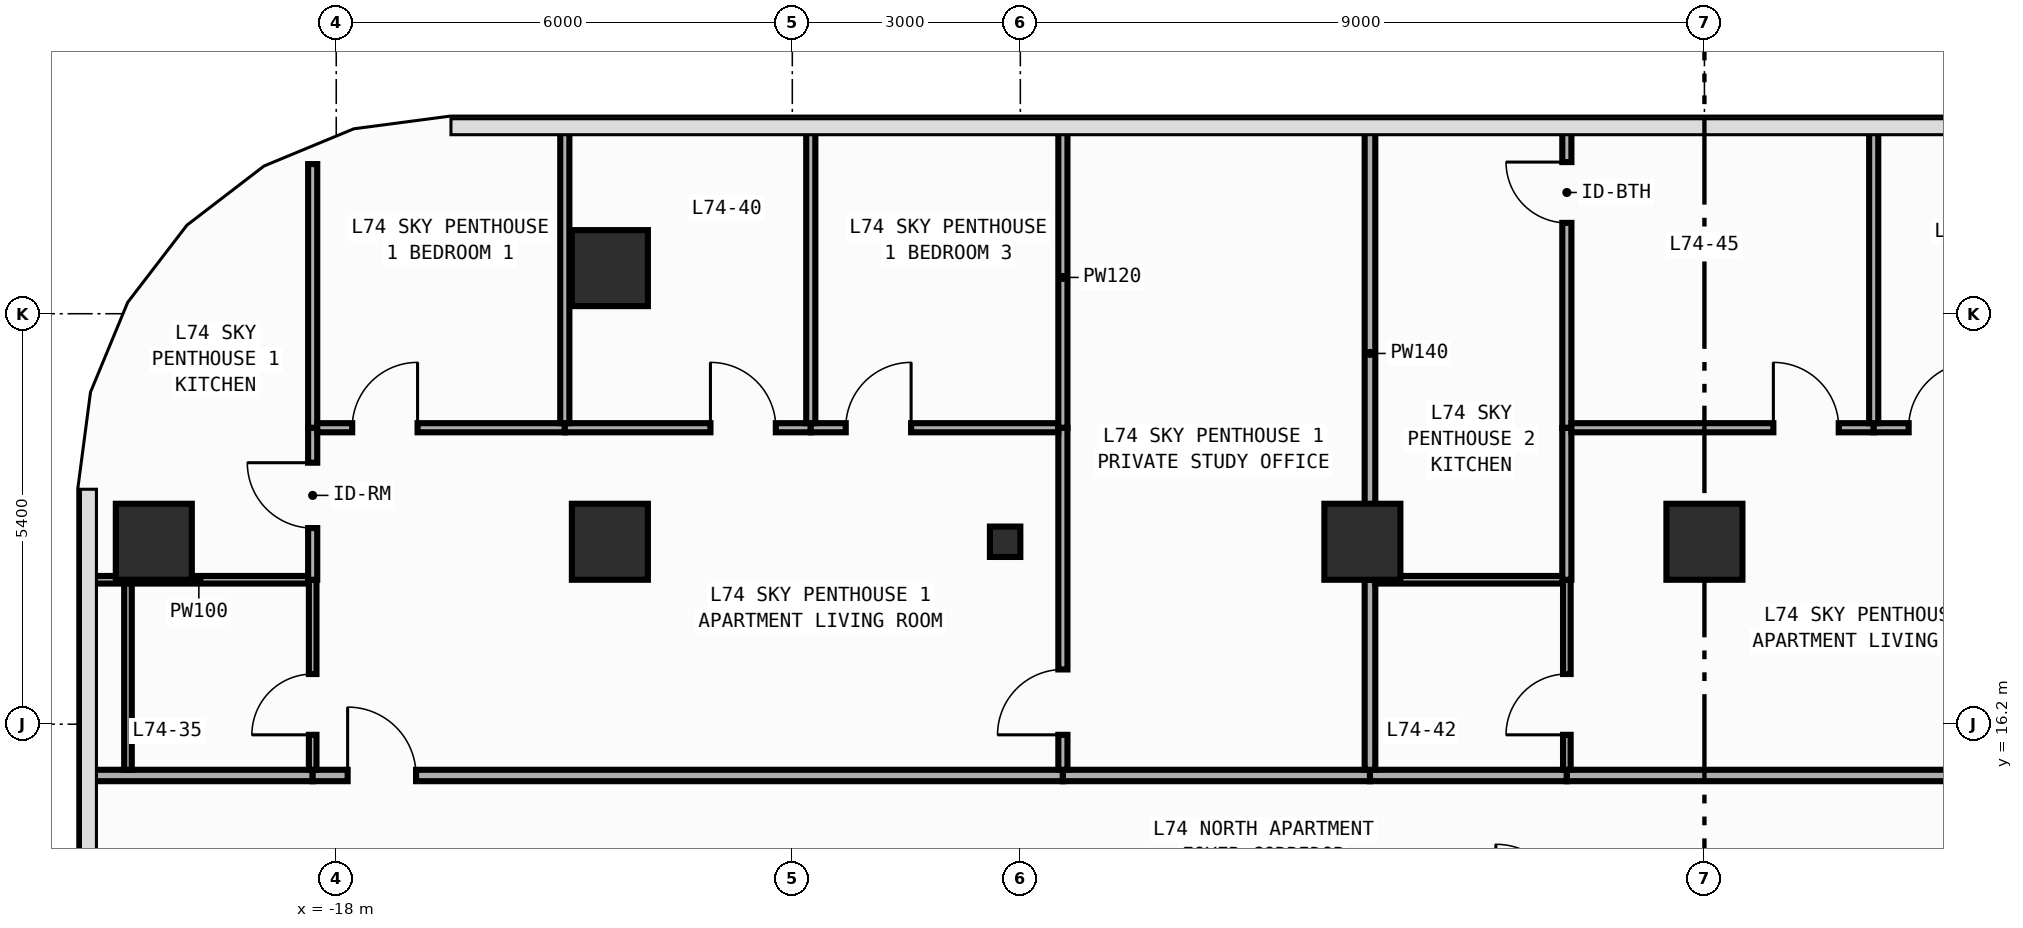
"""IFC4 building model, lengths in metres.
Left out: names, types, materials, properties, quantities, classifications, styles, units other than length and angle.
Written with IfcOpenShell. Run it as: python <this file> out.ifc"""

import sys

from ifc_helpers import new_model, si_unit, direction, frame, frame_2d, origin, origin_2d, place, context, subcontext, project, spatial, rectangle, circle, i_section, extrude, element, fill, save


model = new_model("IFC4")
c1 = context("Model", 3, precision=1e-05, world=origin(), true_north=direction((0.0, 1.0)))
c2 = subcontext(c1, "Body", "Model", "MODEL_VIEW")
j1 = project(units=[si_unit("LENGTHUNIT", "METRE"), si_unit("PLANEANGLEUNIT", "RADIAN")], contexts=[c1])
p1 = place(None, origin())
s1 = spatial("IfcSite", under=j1, at=p1, CompositionType="ELEMENT")
p2 = place(p1, origin())
s2 = spatial("IfcBuilding", under=s1, at=p2, CompositionType="ELEMENT")
p3 = place(p2, frame((0.0, 0.0, 308.0)))
s3 = spatial("IfcBuildingStorey", under=s2, at=p3, CompositionType="ELEMENT", Elevation=308.0)
p4 = place(p3, frame((-9.2, 18.6, 0.0), z_axis=(0.0, 0.0, 1.0), x_axis=(1.0, 0.0, 0.0)))
e1 = element("IfcColumn", 1, at=p4, inside=s3, PredefinedType="COLUMN", context=c2, shape_type="SweptSolid", body=[
    extrude(i_section(OverallWidth=0.4, OverallDepth=0.4, WebThickness=0.013, FlangeThickness=0.021, FilletRadius=0.022, at=origin_2d()), origin(), (0.0, 0.0, 1.0), 3.8),
])
for number, where, z_axis, x_axis in (
    (2, (-20.4, 18.6, 0.0), (0.0, 0.0, 1.0), (1.0, 0.0, 0.0)),
    (3, (-14.4, 18.6, 0.0), (0.0, 0.0, 1.0), (1.0, 0.0, 0.0)),
    (4, (-4.5, 18.6, 0.0), (0.0, 0.0, 1.0), (1.0, 0.0, 0.0)),
    (5, (0.0, 18.6, 0.0), (0.0, 0.0, 1.0), (1.0, 0.0, 0.0)),
    (6, (-14.4, 22.2, 0.0), (0.0, 0.0, 1.0), (1.0, 0.0, 0.0)),
):
    element("IfcColumn", number, at=place(p3, frame(where, z_axis=z_axis, x_axis=x_axis)), inside=s3, PredefinedType="COLUMN", context=c2, shape_type="SweptSolid", body=[
        extrude(circle(Radius=0.5, at=origin_2d()), origin(), (0.0, 0.0, 1.0), 3.8),
    ])
p5 = place(p3, frame((-21.255, 15.525, 0.0), z_axis=(0.0, 0.0, 1.0), x_axis=(1.0, 0.0, 0.0)))
e7 = element("IfcWall", 7, at=p5, inside=s3, PredefinedType="PARTITIONING", context=c2, shape_type="SweptSolid", body=[
    extrude(rectangle(XDim=2.945, YDim=0.15, at=frame_2d((1.472, 0.0))), origin(), (0.0, 0.0, 1.0), 3.54),
])
p6 = place(p3, frame((-18.31, 15.525, 0.0), z_axis=(0.0, 0.0, 1.0), x_axis=(1.0, 0.0, 0.0)))
e8 = element("IfcWall", 8, at=p6, inside=s3, PredefinedType="PARTITIONING", context=c2, shape_type="SweptSolid", body=[
    extrude(rectangle(XDim=9.87, YDim=0.15, at=frame_2d((4.935, 0.0))), origin(), (0.0, 0.0, 1.0), 3.54),
])
p7 = place(p6, frame((0.46, 0.0, 0.0)))
e9 = element("IfcOpeningElement", 9, at=p7, cuts=e8, PredefinedType="OPENING", context=c2, shape_type="SweptSolid", body=[
    extrude(rectangle(XDim=0.9, YDim=2.15, at=frame_2d((0.45, 1.075))), frame((0.0, 0.085, 0.0), z_axis=(0.0, -1.0, 0.0), x_axis=(1.0, 0.0, 0.0)), (0.0, 0.0, 1.0), 0.17),
])
p8 = place(p3, frame((-8.44, 15.525, 0.0), z_axis=(0.0, 0.0, 1.0), x_axis=(1.0, 0.0, 0.0)))
e10 = element("IfcWall", 10, at=p8, inside=s3, PredefinedType="PARTITIONING", context=c2, shape_type="SweptSolid", body=[
    extrude(rectangle(XDim=4.04, YDim=0.15, at=frame_2d((2.02, 0.0))), origin(), (0.0, 0.0, 1.0), 3.54),
])
p9 = place(p3, frame((-4.4, 15.525, 0.0), z_axis=(0.0, 0.0, 1.0), x_axis=(1.0, 0.0, 0.0)))
e11 = element("IfcWall", 11, at=p9, inside=s3, PredefinedType="PARTITIONING", context=c2, shape_type="SweptSolid", body=[
    extrude(rectangle(XDim=2.59, YDim=0.15, at=frame_2d((1.295, 0.0))), origin(), (0.0, 0.0, 1.0), 3.54),
])
p10 = place(p3, frame((-1.81, 15.525, 0.0), z_axis=(0.0, 0.0, 1.0), x_axis=(1.0, 0.0, 0.0)))
e12 = element("IfcWall", 12, at=p10, inside=s3, PredefinedType="PARTITIONING", context=c2, shape_type="SweptSolid", body=[
    extrude(rectangle(XDim=11.25, YDim=0.15, at=frame_2d((5.625, 0.0))), origin(), (0.0, 0.0, 1.0), 3.54),
])
p11 = place(p10, frame((8.486, 0.0, 0.0)))
e13 = element("IfcOpeningElement", 13, at=p11, cuts=e12, PredefinedType="OPENING", context=c2, shape_type="SweptSolid", body=[
    extrude(rectangle(XDim=0.9, YDim=2.15, at=frame_2d((0.45, 1.075))), frame((0.0, 0.085, 0.0), z_axis=(0.0, -1.0, 0.0), x_axis=(1.0, 0.0, 0.0)), (0.0, 0.0, 1.0), 0.17),
])
p12 = place(p3, frame((-21.255, 18.1, 0.0), z_axis=(0.0, 0.0, 1.0), x_axis=(1.0, 0.0, 0.0)))
e14 = element("IfcWall", 14, at=p12, inside=s3, PredefinedType="PARTITIONING", context=c2, shape_type="SweptSolid", body=[
    extrude(rectangle(XDim=2.895, YDim=0.1, at=frame_2d((1.447, 0.0))), origin(), (0.0, 0.0, 1.0), 3.54),
])
p13 = place(p3, frame((-18.31, 15.6, 0.0), z_axis=(0.0, 0.0, 1.0), x_axis=(0.0, 1.0, 0.0)))
e15 = element("IfcWall", 15, at=p13, inside=s3, PredefinedType="PARTITIONING", context=c2, shape_type="SweptSolid", body=[
    extrude(rectangle(XDim=2.5, YDim=0.1, at=frame_2d((1.25, 0.0))), origin(), (0.0, 0.0, 1.0), 3.54),
])
p14 = place(p13, frame((0.46, 0.0, 0.0)))
e16 = element("IfcOpeningElement", 16, at=p14, cuts=e15, PredefinedType="OPENING", context=c2, shape_type="SweptSolid", body=[
    extrude(rectangle(XDim=0.8, YDim=2.1, at=frame_2d((0.4, 1.05))), frame((0.0, 0.06, 0.0), z_axis=(0.0, -1.0, 0.0), x_axis=(1.0, 0.0, 0.0)), (0.0, 0.0, 1.0), 0.12),
])
p15 = place(p3, frame((-18.31, 18.1, 0.0), z_axis=(0.0, 0.0, 1.0), x_axis=(0.0, 1.0, 0.0)))
e17 = element("IfcWall", 17, at=p15, inside=s3, PredefinedType="PARTITIONING", context=c2, shape_type="SweptSolid", body=[
    extrude(rectangle(XDim=2.0, YDim=0.12, at=frame_2d((1.0, 0.0))), origin(), (0.0, 0.0, 1.0), 3.54),
])
p16 = place(p15, frame((0.68, 0.0, 0.0)))
e18 = element("IfcOpeningElement", 18, at=p16, cuts=e17, PredefinedType="OPENING", context=c2, shape_type="SweptSolid", body=[
    extrude(rectangle(XDim=0.86, YDim=2.15, at=frame_2d((0.43, 1.075))), frame((0.0, 0.07, 0.0), z_axis=(0.0, -1.0, 0.0), x_axis=(1.0, 0.0, 0.0)), (0.0, 0.0, 1.0), 0.14),
])
p17 = place(p3, frame((-18.31, 20.1, 0.0), z_axis=(0.0, 0.0, 1.0), x_axis=(0.0, 1.0, 0.0)))
e19 = element("IfcWall", 19, at=p17, inside=s3, PredefinedType="PARTITIONING", context=c2, shape_type="SweptSolid", body=[
    extrude(rectangle(XDim=3.469, YDim=0.12, at=frame_2d((1.734, 0.0))), origin(), (0.0, 0.0, 1.0), 3.54),
])
p18 = place(p3, frame((-8.44, 15.6, 0.0), z_axis=(0.0, 0.0, 1.0), x_axis=(0.0, 1.0, 0.0)))
e20 = element("IfcWall", 20, at=p18, inside=s3, PredefinedType="PARTITIONING", context=c2, shape_type="SweptSolid", body=[
    extrude(rectangle(XDim=4.5, YDim=0.12, at=frame_2d((2.25, 0.0))), origin(), (0.0, 0.0, 1.0), 3.54),
])
p19 = place(p18, frame((0.46, 0.0, 0.0)))
e21 = element("IfcOpeningElement", 21, at=p19, cuts=e20, PredefinedType="OPENING", context=c2, shape_type="SweptSolid", body=[
    extrude(rectangle(XDim=0.86, YDim=2.15, at=frame_2d((0.43, 1.075))), frame((0.0, 0.07, 0.0), z_axis=(0.0, -1.0, 0.0), x_axis=(1.0, 0.0, 0.0)), (0.0, 0.0, 1.0), 0.14),
])
p20 = place(p3, frame((-18.25, 20.1, 0.0), z_axis=(0.0, 0.0, 1.0), x_axis=(1.0, 0.0, 0.0)))
e22 = element("IfcWall", 22, at=p20, inside=s3, PredefinedType="PARTITIONING", context=c2, shape_type="SweptSolid", body=[
    extrude(rectangle(XDim=3.257, YDim=0.12, at=frame_2d((1.628, 0.0))), origin(), (0.0, 0.0, 1.0), 3.54),
])
p21 = place(p20, frame((0.46, 0.0, 0.0)))
e23 = element("IfcOpeningElement", 23, at=p21, cuts=e22, PredefinedType="OPENING", context=c2, shape_type="SweptSolid", body=[
    extrude(rectangle(XDim=0.86, YDim=2.15, at=frame_2d((0.43, 1.075))), frame((0.0, 0.07, 0.0), z_axis=(0.0, -1.0, 0.0), x_axis=(1.0, 0.0, 0.0)), (0.0, 0.0, 1.0), 0.14),
])
p22 = place(p3, frame((-14.993, 20.1, 0.0), z_axis=(0.0, 0.0, 1.0), x_axis=(1.0, 0.0, 0.0)))
e24 = element("IfcWall", 24, at=p22, inside=s3, PredefinedType="PARTITIONING", context=c2, shape_type="SweptSolid", body=[
    extrude(rectangle(XDim=3.236, YDim=0.12, at=frame_2d((1.618, 0.0))), origin(), (0.0, 0.0, 1.0), 3.54),
])
p23 = place(p22, frame((1.916, 0.0, 0.0)))
e25 = element("IfcOpeningElement", 25, at=p23, cuts=e24, PredefinedType="OPENING", context=c2, shape_type="SweptSolid", body=[
    extrude(rectangle(XDim=0.86, YDim=2.15, at=frame_2d((0.43, 1.075))), frame((0.0, 0.07, 0.0), z_axis=(0.0, -1.0, 0.0), x_axis=(1.0, 0.0, 0.0)), (0.0, 0.0, 1.0), 0.14),
])
p24 = place(p3, frame((-11.757, 20.1, 0.0), z_axis=(0.0, 0.0, 1.0), x_axis=(1.0, 0.0, 0.0)))
e26 = element("IfcWall", 26, at=p24, inside=s3, PredefinedType="PARTITIONING", context=c2, shape_type="SweptSolid", body=[
    extrude(rectangle(XDim=3.257, YDim=0.12, at=frame_2d((1.628, 0.0))), origin(), (0.0, 0.0, 1.0), 3.54),
])
p25 = place(p24, frame((0.46, 0.0, 0.0)))
e27 = element("IfcOpeningElement", 27, at=p25, cuts=e26, PredefinedType="OPENING", context=c2, shape_type="SweptSolid", body=[
    extrude(rectangle(XDim=0.86, YDim=2.15, at=frame_2d((0.43, 1.075))), frame((0.0, 0.07, 0.0), z_axis=(0.0, -1.0, 0.0), x_axis=(1.0, 0.0, 0.0)), (0.0, 0.0, 1.0), 0.14),
])
p26 = place(p3, frame((-8.44, 20.1, 0.0), z_axis=(0.0, 0.0, 1.0), x_axis=(0.0, 1.0, 0.0)))
e28 = element("IfcWall", 28, at=p26, inside=s3, PredefinedType="PARTITIONING", context=c2, shape_type="SweptSolid", body=[
    extrude(rectangle(XDim=3.955, YDim=0.12, at=frame_2d((1.978, 0.0))), origin(), (0.0, 0.0, 1.0), 3.54),
])
p27 = place(p3, frame((-4.4, 15.6, 0.0), z_axis=(0.0, 0.0, 1.0), x_axis=(0.0, 1.0, 0.0)))
e29 = element("IfcWall", 29, at=p27, inside=s3, PredefinedType="PARTITIONING", context=c2, shape_type="SweptSolid", body=[
    extrude(rectangle(XDim=2.5, YDim=0.14, at=frame_2d((1.25, 0.0))), origin(), (0.0, 0.0, 1.0), 3.54),
])
p28 = place(p3, frame((-4.4, 18.1, 0.0), z_axis=(0.0, 0.0, 1.0), x_axis=(0.0, 1.0, 0.0)))
e30 = element("IfcWall", 30, at=p28, inside=s3, PredefinedType="PARTITIONING", context=c2, shape_type="SweptSolid", body=[
    extrude(rectangle(XDim=5.955, YDim=0.14, at=frame_2d((2.978, 0.0))), origin(), (0.0, 0.0, 1.0), 3.54),
])
for number, where, z_axis, x_axis in (
    (31, (-14.993, 20.16, 0.0), (0.0, 0.0, 1.0), (0.0, 1.0, 0.0)),
    (32, (-11.757, 20.16, 0.0), (0.0, 0.0, 1.0), (0.0, 1.0, 0.0)),
):
    element("IfcWall", number, at=place(p3, frame(where, z_axis=z_axis, x_axis=x_axis)), inside=s3, PredefinedType="PARTITIONING", context=c2, shape_type="SweptSolid", body=[
        extrude(rectangle(XDim=3.895, YDim=0.12, at=frame_2d((1.948, 0.0))), origin(), (0.0, 0.0, 1.0), 3.54),
    ])
p29 = place(p3, frame((-4.33, 18.1, 0.0), z_axis=(0.0, 0.0, 1.0), x_axis=(1.0, 0.0, 0.0)))
e33 = element("IfcWall", 33, at=p29, inside=s3, PredefinedType="PARTITIONING", context=c2, shape_type="SweptSolid", body=[
    extrude(rectangle(XDim=2.47, YDim=0.1, at=frame_2d((1.235, 0.0))), origin(), (0.0, 0.0, 1.0), 3.54),
])
p30 = place(p3, frame((-1.81, 15.6, 0.0), z_axis=(0.0, 0.0, 1.0), x_axis=(0.0, 1.0, 0.0)))
e34 = element("IfcWall", 34, at=p30, inside=s3, PredefinedType="PARTITIONING", context=c2, shape_type="SweptSolid", body=[
    extrude(rectangle(XDim=2.5, YDim=0.1, at=frame_2d((1.25, 0.0))), origin(), (0.0, 0.0, 1.0), 3.54),
])
p31 = place(p30, frame((0.46, 0.0, 0.0)))
e35 = element("IfcOpeningElement", 35, at=p31, cuts=e34, PredefinedType="OPENING", context=c2, shape_type="SweptSolid", body=[
    extrude(rectangle(XDim=0.8, YDim=2.1, at=frame_2d((0.4, 1.05))), frame((0.0, 0.06, 0.0), z_axis=(0.0, -1.0, 0.0), x_axis=(1.0, 0.0, 0.0)), (0.0, 0.0, 1.0), 0.12),
])
p32 = place(p3, frame((-1.81, 18.1, 0.0), z_axis=(0.0, 0.0, 1.0), x_axis=(0.0, 1.0, 0.0)))
e36 = element("IfcWall", 36, at=p32, inside=s3, PredefinedType="PARTITIONING", context=c2, shape_type="SweptSolid", body=[
    extrude(rectangle(XDim=2.0, YDim=0.12, at=frame_2d((1.0, 0.0))), origin(), (0.0, 0.0, 1.0), 3.54),
])
p33 = place(p3, frame((-1.81, 20.1, 0.0), z_axis=(0.0, 0.0, 1.0), x_axis=(0.0, 1.0, 0.0)))
e37 = element("IfcWall", 37, at=p33, inside=s3, PredefinedType="PARTITIONING", context=c2, shape_type="SweptSolid", body=[
    extrude(rectangle(XDim=3.955, YDim=0.12, at=frame_2d((1.978, 0.0))), origin(), (0.0, 0.0, 1.0), 3.54),
])
p34 = place(p33, frame((2.695, 0.0, 0.0)))
e38 = element("IfcOpeningElement", 38, at=p34, cuts=e37, PredefinedType="OPENING", context=c2, shape_type="SweptSolid", body=[
    extrude(rectangle(XDim=0.8, YDim=2.1, at=frame_2d((0.4, 1.05))), frame((0.0, 0.07, 0.0), z_axis=(0.0, -1.0, 0.0), x_axis=(1.0, 0.0, 0.0)), (0.0, 0.0, 1.0), 0.14),
])
p35 = place(p3, frame((-1.75, 20.1, 0.0), z_axis=(0.0, 0.0, 1.0), x_axis=(1.0, 0.0, 0.0)))
e39 = element("IfcWall", 39, at=p35, inside=s3, PredefinedType="PARTITIONING", context=c2, shape_type="SweptSolid", body=[
    extrude(rectangle(XDim=3.977, YDim=0.12, at=frame_2d((1.989, 0.0))), origin(), (0.0, 0.0, 1.0), 3.54),
])
p36 = place(p35, frame((2.657, 0.0, 0.0)))
e40 = element("IfcOpeningElement", 40, at=p36, cuts=e39, PredefinedType="OPENING", context=c2, shape_type="SweptSolid", body=[
    extrude(rectangle(XDim=0.86, YDim=2.15, at=frame_2d((0.43, 1.075))), frame((0.0, 0.07, 0.0), z_axis=(0.0, -1.0, 0.0), x_axis=(1.0, 0.0, 0.0)), (0.0, 0.0, 1.0), 0.14),
])
p37 = place(p3, frame((2.227, 20.1, 0.0), z_axis=(0.0, 0.0, 1.0), x_axis=(1.0, 0.0, 0.0)))
e41 = element("IfcWall", 41, at=p37, inside=s3, PredefinedType="PARTITIONING", context=c2, shape_type="SweptSolid", body=[
    extrude(rectangle(XDim=3.956, YDim=0.12, at=frame_2d((1.978, 0.0))), origin(), (0.0, 0.0, 1.0), 3.54),
])
p38 = place(p37, frame((0.46, 0.0, 0.0)))
e42 = element("IfcOpeningElement", 42, at=p38, cuts=e41, PredefinedType="OPENING", context=c2, shape_type="SweptSolid", body=[
    extrude(rectangle(XDim=0.86, YDim=2.15, at=frame_2d((0.43, 1.075))), frame((0.0, 0.07, 0.0), z_axis=(0.0, -1.0, 0.0), x_axis=(1.0, 0.0, 0.0)), (0.0, 0.0, 1.0), 0.14),
])
p39 = place(p3, frame((2.227, 20.16, 0.0), z_axis=(0.0, 0.0, 1.0), x_axis=(0.0, 1.0, 0.0)))
e43 = element("IfcWall", 43, at=p39, inside=s3, PredefinedType="PARTITIONING", context=c2, shape_type="SweptSolid", body=[
    extrude(rectangle(XDim=3.895, YDim=0.12, at=frame_2d((1.948, 0.0))), origin(), (0.0, 0.0, 1.0), 3.54),
])
p40 = place(p3, frame((-20.74, 15.6, 0.0), z_axis=(0.0, 0.0, 1.0), x_axis=(0.0, 1.0, 0.0)))
e44 = element("IfcWall", 44, at=p40, inside=s3, PredefinedType="PARTITIONING", context=c2, shape_type="SweptSolid", body=[
    extrude(rectangle(XDim=2.45, YDim=0.1, at=frame_2d((1.225, 0.0))), origin(), (0.0, 0.0, 1.0), 3.54),
])
p41 = place(p7, origin())
e45 = element("IfcDoor", 45, at=p41, inside=s3, OperationType="SINGLE_SWING_LEFT", PredefinedType="DOOR", context=c2, shape_type="SweptSolid", body=[
    extrude(rectangle(XDim=0.9, YDim=2.15, at=frame_2d((0.45, 1.075))), frame((0.0, 0.025, 0.0), z_axis=(0.0, -1.0, 0.0), x_axis=(1.0, 0.0, 0.0)), (0.0, 0.0, 1.0), 0.05),
])
fill(e9, e45)
p42 = place(p14, origin())
e46 = element("IfcDoor", 46, at=p42, inside=s3, OperationType="SINGLE_SWING_LEFT", PredefinedType="DOOR", context=c2, shape_type="SweptSolid", body=[
    extrude(rectangle(XDim=0.8, YDim=2.1, at=frame_2d((0.4, 1.05))), frame((0.0, 0.025, 0.0), z_axis=(0.0, -1.0, 0.0), x_axis=(1.0, 0.0, 0.0)), (0.0, 0.0, 1.0), 0.05),
])
fill(e16, e46)
p43 = place(p16, origin())
e47 = element("IfcDoor", 47, at=p43, inside=s3, OperationType="SINGLE_SWING_RIGHT", PredefinedType="DOOR", context=c2, shape_type="SweptSolid", body=[
    extrude(rectangle(XDim=0.86, YDim=2.15, at=frame_2d((0.43, 1.075))), frame((0.0, 0.025, 0.0), z_axis=(0.0, -1.0, 0.0), x_axis=(1.0, 0.0, 0.0)), (0.0, 0.0, 1.0), 0.05),
])
fill(e18, e47)
p44 = place(p19, origin())
e48 = element("IfcDoor", 48, at=p44, inside=s3, OperationType="SINGLE_SWING_LEFT", PredefinedType="DOOR", context=c2, shape_type="SweptSolid", body=[
    extrude(rectangle(XDim=0.86, YDim=2.15, at=frame_2d((0.43, 1.075))), frame((0.0, 0.025, 0.0), z_axis=(0.0, -1.0, 0.0), x_axis=(1.0, 0.0, 0.0)), (0.0, 0.0, 1.0), 0.05),
])
fill(e21, e48)
p45 = place(p21, origin())
e49 = element("IfcDoor", 49, at=p45, inside=s3, OperationType="SINGLE_SWING_RIGHT", PredefinedType="DOOR", context=c2, shape_type="SweptSolid", body=[
    extrude(rectangle(XDim=0.86, YDim=2.15, at=frame_2d((0.43, 1.075))), frame((0.0, 0.025, 0.0), z_axis=(0.0, -1.0, 0.0), x_axis=(1.0, 0.0, 0.0)), (0.0, 0.0, 1.0), 0.05),
])
fill(e23, e49)
p46 = place(p23, origin())
e50 = element("IfcDoor", 50, at=p46, inside=s3, OperationType="SINGLE_SWING_LEFT", PredefinedType="DOOR", context=c2, shape_type="SweptSolid", body=[
    extrude(rectangle(XDim=0.86, YDim=2.15, at=frame_2d((0.43, 1.075))), frame((0.0, 0.025, 0.0), z_axis=(0.0, -1.0, 0.0), x_axis=(1.0, 0.0, 0.0)), (0.0, 0.0, 1.0), 0.05),
])
fill(e25, e50)
p47 = place(p25, origin())
e51 = element("IfcDoor", 51, at=p47, inside=s3, OperationType="SINGLE_SWING_RIGHT", PredefinedType="DOOR", context=c2, shape_type="SweptSolid", body=[
    extrude(rectangle(XDim=0.86, YDim=2.15, at=frame_2d((0.43, 1.075))), frame((0.0, 0.025, 0.0), z_axis=(0.0, -1.0, 0.0), x_axis=(1.0, 0.0, 0.0)), (0.0, 0.0, 1.0), 0.05),
])
fill(e27, e51)
p48 = place(p31, origin())
e52 = element("IfcDoor", 52, at=p48, inside=s3, OperationType="SINGLE_SWING_LEFT", PredefinedType="DOOR", context=c2, shape_type="SweptSolid", body=[
    extrude(rectangle(XDim=0.8, YDim=2.1, at=frame_2d((0.4, 1.05))), frame((0.0, 0.025, 0.0), z_axis=(0.0, -1.0, 0.0), x_axis=(1.0, 0.0, 0.0)), (0.0, 0.0, 1.0), 0.05),
])
fill(e35, e52)
p49 = place(p36, origin())
e53 = element("IfcDoor", 53, at=p49, inside=s3, OperationType="SINGLE_SWING_LEFT", PredefinedType="DOOR", context=c2, shape_type="SweptSolid", body=[
    extrude(rectangle(XDim=0.86, YDim=2.15, at=frame_2d((0.43, 1.075))), frame((0.0, 0.025, 0.0), z_axis=(0.0, -1.0, 0.0), x_axis=(1.0, 0.0, 0.0)), (0.0, 0.0, 1.0), 0.05),
])
fill(e40, e53)
p50 = place(p38, origin())
e54 = element("IfcDoor", 54, at=p50, inside=s3, OperationType="SINGLE_SWING_RIGHT", PredefinedType="DOOR", context=c2, shape_type="SweptSolid", body=[
    extrude(rectangle(XDim=0.86, YDim=2.15, at=frame_2d((0.43, 1.075))), frame((0.0, 0.025, 0.0), z_axis=(0.0, -1.0, 0.0), x_axis=(1.0, 0.0, 0.0)), (0.0, 0.0, 1.0), 0.05),
])
fill(e42, e54)
p51 = place(p34, origin())
e55 = element("IfcDoor", 55, at=p51, inside=s3, OperationType="SINGLE_SWING_RIGHT", PredefinedType="DOOR", context=c2, shape_type="SweptSolid", body=[
    extrude(rectangle(XDim=0.8, YDim=2.1, at=frame_2d((0.4, 1.05))), frame((0.0, 0.025, 0.0), z_axis=(0.0, -1.0, 0.0), x_axis=(1.0, 0.0, 0.0)), (0.0, 0.0, 1.0), 0.05),
])
fill(e38, e55)
save(model, sys.argv[1])
